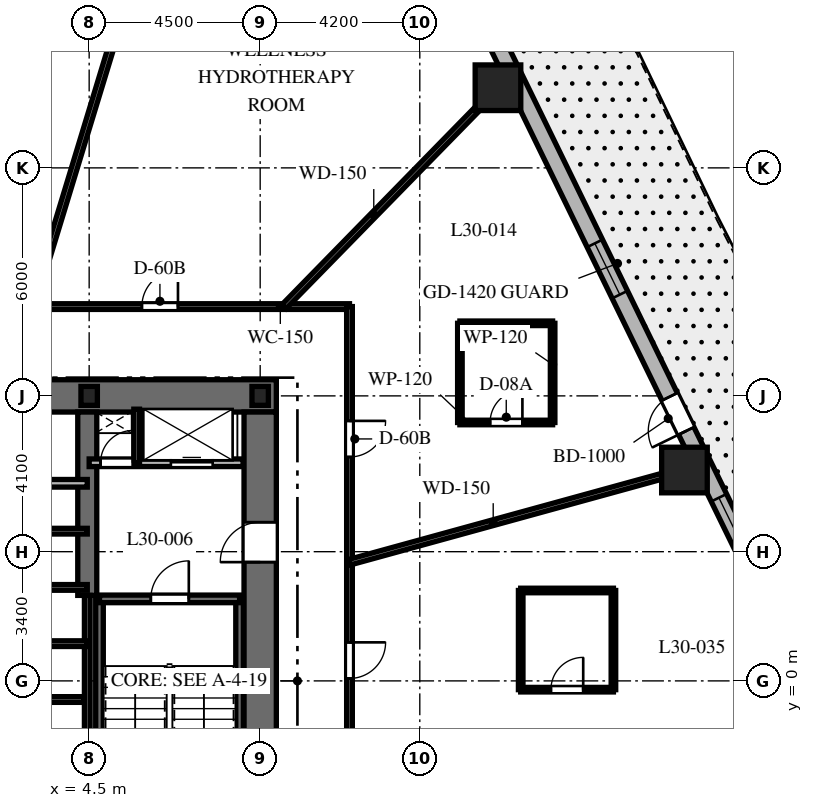
"""IFC4 building model, lengths in metres.
Left out: names, types, materials, properties, quantities, classifications, styles, units other than length and angle.
Written with IfcOpenShell. Run it as: python <this file> out.ifc"""

import sys

from ifc_helpers import new_model, si_unit, direction, frame, frame_2d, origin, origin_2d, place, context, subcontext, project, spatial, rectangle, i_section, extrude, element, fill, save


model = new_model("IFC4")
c1 = context("Model", 3, precision=1e-05, world=origin(), true_north=direction((0.0, 1.0)))
c2 = subcontext(c1, "Body", "Model", "MODEL_VIEW")
j1 = project(units=[si_unit("LENGTHUNIT", "METRE"), si_unit("PLANEANGLEUNIT", "RADIAN")], contexts=[c1])
p1 = place(None, origin())
s1 = spatial("IfcSite", under=j1, at=p1, CompositionType="ELEMENT")
p2 = place(p1, origin())
s2 = spatial("IfcBuilding", under=s1, at=p2, CompositionType="ELEMENT")
p3 = place(p2, frame((0.0, 0.0, 124.7)))
s3 = spatial("IfcBuildingStorey", under=s2, at=p3, CompositionType="ELEMENT", Elevation=124.7)
p4 = place(p3, frame((1.85, 7.5, 0.0), z_axis=(0.0, 0.0, 1.0), x_axis=(1.0, 0.0, 0.0)))
e1 = element("IfcWall", 1, at=p4, inside=s3, PredefinedType="SHEAR", context=c2, shape_type="SweptSolid", body=[
    extrude(rectangle(XDim=7.575, YDim=0.85, at=frame_2d((3.788, 0.0))), origin(), (0.0, 0.0, 1.0), 3.7),
])
p5 = place(p3, frame((9.0, -7.075, 0.0), z_axis=(0.0, 0.0, 1.0), x_axis=(0.0, 1.0, 0.0)))
e2 = element("IfcWall", 2, at=p5, inside=s3, PredefinedType="SHEAR", context=c2, shape_type="SweptSolid", body=[
    extrude(rectangle(XDim=14.15, YDim=0.85, at=frame_2d((7.075, 0.0))), origin(), (0.0, 0.0, 1.0), 3.7),
])
p6 = place(p5, frame((10.2, 0.0, 0.0)))
e3 = element("IfcOpeningElement", 3, at=p6, cuts=e2, PredefinedType="OPENING", context=c2, shape_type="SweptSolid", body=[
    extrude(rectangle(XDim=1.05, YDim=2.15, at=frame_2d((0.525, 1.075))), frame((0.0, 0.435, 0.0), z_axis=(0.0, -1.0, 0.0), x_axis=(1.0, 0.0, 0.0)), (0.0, 0.0, 1.0), 0.87),
])
p7 = place(p3, frame((4.45, 2.25, 0.0), z_axis=(0.0, 0.0, 1.0), x_axis=(0.0, 1.0, 0.0)))
e4 = element("IfcWall", 4, at=p7, inside=s3, PredefinedType="SHEAR", context=c2, shape_type="SweptSolid", body=[
    extrude(rectangle(XDim=4.825, YDim=0.5, at=frame_2d((2.413, 0.0))), origin(), (0.0, 0.0, 1.0), 3.7),
])
for number, where, z_axis, x_axis in (
    (5, (4.772, -6.985, 0.0), (0.0, 0.0, 1.0), (0.0, 1.0, 0.0)),
    (6, (8.458, -6.985, 0.0), (0.0, 0.0, 1.0), (0.0, 1.0, 0.0)),
):
    element("IfcWall", number, at=place(p3, frame(where, z_axis=z_axis, x_axis=x_axis)), inside=s3, PredefinedType="SHEAR", context=c2, shape_type="SweptSolid", body=[
        extrude(rectangle(XDim=9.143, YDim=0.2, at=frame_2d((4.572, 0.0))), origin(), (0.0, 0.0, 1.0), 3.7),
    ])
p8 = place(p3, frame((4.772, 2.158, 0.0), z_axis=(0.0, 0.0, 1.0), x_axis=(1.0, 0.0, 0.0)))
e7 = element("IfcWall", 7, at=p8, inside=s3, PredefinedType="SHEAR", context=c2, shape_type="SweptSolid", body=[
    extrude(rectangle(XDim=3.686, YDim=0.2, at=frame_2d((1.843, 0.0))), origin(), (0.0, 0.0, 1.0), 3.7),
])
p9 = place(p8, frame((1.35, 0.0, 0.0)))
e8 = element("IfcOpeningElement", 8, at=p9, cuts=e7, PredefinedType="OPENING", context=c2, shape_type="SweptSolid", body=[
    extrude(rectangle(XDim=1.0, YDim=2.15, at=frame_2d((0.5, 1.075))), frame((0.0, 0.11, 0.0), z_axis=(0.0, -1.0, 0.0), x_axis=(1.0, 0.0, 0.0)), (0.0, 0.0, 1.0), 0.22),
])
for number, where, z_axis, x_axis in (
    (9, (9.0, 7.5, 0.0), (0.0, 0.0, 1.0), (1.0, 0.0, 0.0)),
    (10, (4.5, 7.5, 0.0), (0.0, 0.0, 1.0), (1.0, 0.0, 0.0)),
):
    element("IfcColumn", number, at=place(p3, frame(where, z_axis=z_axis, x_axis=x_axis)), inside=s3, PredefinedType="COLUMN", context=c2, shape_type="SweptSolid", body=[
        extrude(i_section(OverallWidth=0.432, OverallDepth=0.498, WebThickness=0.056, FlangeThickness=0.089, at=origin_2d()), origin(), (0.0, 0.0, 1.0), 3.7),
    ])
for number, where, z_axis, x_axis in (
    (11, (20.164, 5.549, 0.0), (0.0, 0.0, 1.0), (1.0, 0.0, 0.0)),
    (12, (15.257, 15.609, 0.0), (0.0, 0.0, 1.0), (1.0, 0.0, 0.0)),
):
    element("IfcColumn", number, at=place(p3, frame(where, z_axis=z_axis, x_axis=x_axis)), inside=s3, PredefinedType="COLUMN", context=c2, shape_type="SweptSolid", body=[
        extrude(rectangle(XDim=1.2, YDim=1.2, at=origin_2d()), origin(), (0.0, 0.0, 1.0), 3.7),
    ])
p10 = place(p3, frame((15.992, -18.777, 0.0), z_axis=(0.0, 0.0, 1.0), x_axis=(0.325606988926, 0.945505202927, 0.0)))
e13 = element("IfcWall", 13, at=p10, inside=s3, PredefinedType="SOLIDWALL", context=c2, shape_type="SweptSolid", body=[
    extrude(rectangle(XDim=19.669, YDim=0.45, at=frame_2d((9.835, 0.0))), origin(), (0.0, 0.0, 1.0), 3.4),
])
p11 = place(p10, frame((1.197, 0.0, 0.8)))
e14 = element("IfcOpeningElement", 14, at=p11, cuts=e13, PredefinedType="OPENING", context=c2, shape_type="SweptSolid", body=[
    extrude(rectangle(XDim=1.5, YDim=1.8, at=frame_2d((0.75, 0.9))), frame((0.0, 0.235, 0.0), z_axis=(0.0, -1.0, 0.0), x_axis=(1.0, 0.0, 0.0)), (0.0, 0.0, 1.0), 0.47),
])
p12 = place(p10, frame((9.03, 0.0, 0.8)))
e15 = element("IfcOpeningElement", 15, at=p12, cuts=e13, PredefinedType="OPENING", context=c2, shape_type="SweptSolid", body=[
    extrude(rectangle(XDim=1.5, YDim=1.8, at=frame_2d((0.75, 0.9))), frame((0.0, 0.235, 0.0), z_axis=(0.0, -1.0, 0.0), x_axis=(1.0, 0.0, 0.0)), (0.0, 0.0, 1.0), 0.47),
])
p13 = place(p10, frame((16.918, 0.0, 0.8)))
e16 = element("IfcOpeningElement", 16, at=p13, cuts=e13, PredefinedType="OPENING", context=c2, shape_type="SweptSolid", body=[
    extrude(rectangle(XDim=1.5, YDim=1.8, at=frame_2d((0.75, 0.9))), frame((0.0, 0.235, 0.0), z_axis=(0.0, -1.0, 0.0), x_axis=(1.0, 0.0, 0.0)), (0.0, 0.0, 1.0), 0.47),
])
p14 = place(p3, frame((22.238, 2.427, 0.0), z_axis=(0.0, 0.0, 1.0), x_axis=(-0.438374803278, 0.898792262901, 0.0)))
e17 = element("IfcWall", 17, at=p14, inside=s3, PredefinedType="SOLIDWALL", context=c2, shape_type="SweptSolid", body=[
    extrude(rectangle(XDim=18.618, YDim=0.45, at=frame_2d((9.309, 0.0))), origin(), (0.0, 0.0, 1.0), 3.4),
])
p15 = place(p14, frame((4.62, 0.0, 0.0)))
e18 = element("IfcOpeningElement", 18, at=p15, cuts=e17, PredefinedType="OPENING", context=c2, shape_type="SweptSolid", body=[
    extrude(rectangle(XDim=1.0, YDim=2.15, at=frame_2d((0.5, 1.075))), frame((0.0, 0.235, 0.0), z_axis=(0.0, -1.0, 0.0), x_axis=(1.0, 0.0, 0.0)), (0.0, 0.0, 1.0), 0.47),
])
p16 = place(p14, frame((8.61, 0.0, 0.8)))
e19 = element("IfcOpeningElement", 19, at=p16, cuts=e17, PredefinedType="OPENING", context=c2, shape_type="SweptSolid", body=[
    extrude(rectangle(XDim=1.5, YDim=1.8, at=frame_2d((0.75, 0.9))), frame((0.0, 0.235, 0.0), z_axis=(0.0, -1.0, 0.0), x_axis=(1.0, 0.0, 0.0)), (0.0, 0.0, 1.0), 0.47),
])
p17 = place(p14, frame((16.006, 0.0, 0.8)))
e20 = element("IfcOpeningElement", 20, at=p17, cuts=e17, PredefinedType="OPENING", context=c2, shape_type="SweptSolid", body=[
    extrude(rectangle(XDim=1.5, YDim=1.8, at=frame_2d((0.75, 0.9))), frame((0.0, 0.235, 0.0), z_axis=(0.0, -1.0, 0.0), x_axis=(1.0, 0.0, 0.0)), (0.0, 0.0, 1.0), 0.47),
])
p18 = place(p14, frame((1.163, 0.0, 0.8)))
e21 = element("IfcOpeningElement", 21, at=p18, cuts=e17, PredefinedType="OPENING", context=c2, shape_type="SweptSolid", body=[
    extrude(rectangle(XDim=1.5, YDim=1.8, at=frame_2d((0.75, 0.9))), frame((0.0, 0.235, 0.0), z_axis=(0.0, -1.0, 0.0), x_axis=(1.0, 0.0, 0.0)), (0.0, 0.0, 1.0), 0.47),
])
p19 = place(p3, frame((4.5, 5.74, 0.0), z_axis=(0.0, 0.0, 1.0), x_axis=(1.0, 0.0, 0.0)))
e22 = element("IfcWall", 22, at=p19, inside=s3, PredefinedType="PARTITIONING", context=c2, shape_type="SweptSolid", body=[
    extrude(rectangle(XDim=4.05, YDim=0.2, at=frame_2d((2.025, 0.0))), origin(), (0.0, 0.0, 1.0), 3.4),
])
p20 = place(p19, frame((0.3, 0.0, 0.0)))
e23 = element("IfcOpeningElement", 23, at=p20, cuts=e22, PredefinedType="OPENING", context=c2, shape_type="SweptSolid", body=[
    extrude(rectangle(XDim=0.85, YDim=2.03, at=frame_2d((0.425, 1.015))), frame((0.0, 0.11, 0.0), z_axis=(0.0, -1.0, 0.0), x_axis=(1.0, 0.0, 0.0)), (0.0, 0.0, 1.0), 0.22),
])
p21 = place(p19, frame((2.15, 0.0, 0.0)))
e24 = element("IfcOpeningElement", 24, at=p21, cuts=e22, PredefinedType="OPENING", context=c2, shape_type="SweptSolid", body=[
    extrude(rectangle(XDim=1.1, YDim=2.2, at=frame_2d((0.55, 1.1))), frame((0.0, 0.11, 0.0), z_axis=(0.0, -1.0, 0.0), x_axis=(1.0, 0.0, 0.0)), (0.0, 0.0, 1.0), 0.22),
])
p22 = place(p3, frame((5.75, 5.74, 0.0), z_axis=(0.0, 0.0, 1.0), x_axis=(0.0, 1.0, 0.0)))
e25 = element("IfcWall", 25, at=p22, inside=s3, PredefinedType="PARTITIONING", context=c2, shape_type="SweptSolid", body=[
    extrude(rectangle(XDim=1.41, YDim=0.15, at=frame_2d((0.705, 0.0))), origin(), (0.0, 0.0, 1.0), 3.4),
])
p23 = place(p3, frame((1.85, 5.2, 0.0), z_axis=(0.0, 0.0, 1.0), x_axis=(1.0, 0.0, 0.0)))
e26 = element("IfcWall", 26, at=p23, inside=s3, PredefinedType="PARTITIONING", context=c2, shape_type="SweptSolid", body=[
    extrude(rectangle(XDim=2.6, YDim=0.2, at=frame_2d((1.3, 0.0))), origin(), (0.0, 0.0, 1.0), 3.4),
])
p24 = place(p3, frame((4.45, -1.972, 0.0), z_axis=(0.0, 0.0, 1.0), x_axis=(0.0, 1.0, 0.0)))
e27 = element("IfcWall", 27, at=p24, inside=s3, PredefinedType="PARTITIONING", context=c2, shape_type="SweptSolid", body=[
    extrude(rectangle(XDim=4.222, YDim=0.15, at=frame_2d((2.111, 0.0))), origin(), (0.0, 0.0, 1.0), 3.4),
])
for number, where, z_axis, x_axis in (
    (28, (1.9, 3.94, 0.0), (0.0, 0.0, 1.0), (1.0, 0.0, 0.0)),
    (29, (1.9, 0.98, 0.0), (0.0, 0.0, 1.0), (1.0, 0.0, 0.0)),
    (30, (1.9, 2.46, 0.0), (0.0, 0.0, 1.0), (1.0, 0.0, 0.0)),
):
    element("IfcWall", number, at=place(p3, frame(where, z_axis=z_axis, x_axis=x_axis)), inside=s3, PredefinedType="PARTITIONING", context=c2, shape_type="SweptSolid", body=[
        extrude(rectangle(XDim=2.55, YDim=0.15, at=frame_2d((1.275, 0.0))), origin(), (0.0, 0.0, 1.0), 3.4),
    ])
p25 = place(p3, frame((-4.36, -0.49, 0.0), z_axis=(0.0, 0.0, 1.0), x_axis=(1.0, 0.0, 0.0)))
e31 = element("IfcWall", 31, at=p25, inside=s3, PredefinedType="PARTITIONING", context=c2, shape_type="SweptSolid", body=[
    extrude(rectangle(XDim=8.72, YDim=0.15, at=frame_2d((4.36, 0.0))), origin(), (0.0, 0.0, 1.0), 3.4),
])
p26 = place(p25, frame((2.81, 0.0, 0.0)))
e32 = element("IfcOpeningElement", 32, at=p26, cuts=e31, PredefinedType="OPENING", context=c2, shape_type="SweptSolid", body=[
    extrude(rectangle(XDim=0.85, YDim=2.03, at=frame_2d((0.425, 1.015))), frame((0.0, 0.085, 0.0), z_axis=(0.0, -1.0, 0.0), x_axis=(1.0, 0.0, 0.0)), (0.0, 0.0, 1.0), 0.17),
])
p27 = place(p25, frame((4.61, 0.0, 0.0)))
e33 = element("IfcOpeningElement", 33, at=p27, cuts=e31, PredefinedType="OPENING", context=c2, shape_type="SweptSolid", body=[
    extrude(rectangle(XDim=0.85, YDim=2.03, at=frame_2d((0.425, 1.015))), frame((0.0, 0.085, 0.0), z_axis=(0.0, -1.0, 0.0), x_axis=(1.0, 0.0, 0.0)), (0.0, 0.0, 1.0), 0.17),
])
p28 = place(p3, frame((-11.35, 9.85, 0.0), z_axis=(0.0, 0.0, 1.0), x_axis=(1.0, 0.0, 0.0)))
e34 = element("IfcWall", 34, at=p28, inside=s3, PredefinedType="PARTITIONING", context=c2, shape_type="SweptSolid", body=[
    extrude(rectangle(XDim=22.7, YDim=0.15, at=frame_2d((11.35, 0.0))), origin(), (0.0, 0.0, 1.0), 2.84),
])
p29 = place(p28, frame((17.237, 0.0, 0.0)))
e35 = element("IfcOpeningElement", 35, at=p29, cuts=e34, PredefinedType="OPENING", context=c2, shape_type="SweptSolid", body=[
    extrude(rectangle(XDim=0.95, YDim=2.03, at=frame_2d((0.475, 1.015))), frame((0.0, 0.085, 0.0), z_axis=(0.0, -1.0, 0.0), x_axis=(1.0, 0.0, 0.0)), (0.0, 0.0, 1.0), 0.17),
])
p30 = place(p28, frame((11.994, 0.0, 0.0)))
e36 = element("IfcOpeningElement", 36, at=p30, cuts=e34, PredefinedType="OPENING", context=c2, shape_type="SweptSolid", body=[
    extrude(rectangle(XDim=0.95, YDim=2.03, at=frame_2d((0.475, 1.015))), frame((0.0, 0.085, 0.0), z_axis=(0.0, -1.0, 0.0), x_axis=(1.0, 0.0, 0.0)), (0.0, 0.0, 1.0), 0.17),
])
p31 = place(p28, frame((8.559, 0.0, 0.0)))
e37 = element("IfcOpeningElement", 37, at=p31, cuts=e34, PredefinedType="OPENING", context=c2, shape_type="SweptSolid", body=[
    extrude(rectangle(XDim=0.95, YDim=2.03, at=frame_2d((0.475, 1.015))), frame((0.0, 0.085, 0.0), z_axis=(0.0, -1.0, 0.0), x_axis=(1.0, 0.0, 0.0)), (0.0, 0.0, 1.0), 0.17),
])
p32 = place(p28, frame((3.399, 0.0, 0.0)))
e38 = element("IfcOpeningElement", 38, at=p32, cuts=e34, PredefinedType="OPENING", context=c2, shape_type="SweptSolid", body=[
    extrude(rectangle(XDim=0.95, YDim=2.03, at=frame_2d((0.475, 1.015))), frame((0.0, 0.085, 0.0), z_axis=(0.0, -1.0, 0.0), x_axis=(1.0, 0.0, 0.0)), (0.0, 0.0, 1.0), 0.17),
])
p33 = place(p3, frame((11.35, 9.85, 0.0), z_axis=(0.0, 0.0, 1.0), x_axis=(0.0, -1.0, 0.0)))
e39 = element("IfcWall", 39, at=p33, inside=s3, PredefinedType="PARTITIONING", context=c2, shape_type="SweptSolid", body=[
    extrude(rectangle(XDim=19.7, YDim=0.15, at=frame_2d((9.85, 0.0))), origin(), (0.0, 0.0, 1.0), 2.84),
])
p34 = place(p33, frame((3.008, 0.0, 0.0)))
e40 = element("IfcOpeningElement", 40, at=p34, cuts=e39, PredefinedType="OPENING", context=c2, shape_type="SweptSolid", body=[
    extrude(rectangle(XDim=0.95, YDim=2.03, at=frame_2d((0.475, 1.015))), frame((0.0, 0.085, 0.0), z_axis=(0.0, -1.0, 0.0), x_axis=(1.0, 0.0, 0.0)), (0.0, 0.0, 1.0), 0.17),
])
p35 = place(p33, frame((15.205, 0.0, 0.0)))
e41 = element("IfcOpeningElement", 41, at=p35, cuts=e39, PredefinedType="OPENING", context=c2, shape_type="SweptSolid", body=[
    extrude(rectangle(XDim=0.95, YDim=2.03, at=frame_2d((0.475, 1.015))), frame((0.0, 0.085, 0.0), z_axis=(0.0, -1.0, 0.0), x_axis=(1.0, 0.0, 0.0)), (0.0, 0.0, 1.0), 0.17),
])
p36 = place(p33, frame((8.836, 0.0, 0.0)))
e42 = element("IfcOpeningElement", 42, at=p36, cuts=e39, PredefinedType="OPENING", context=c2, shape_type="SweptSolid", body=[
    extrude(rectangle(XDim=0.95, YDim=2.03, at=frame_2d((0.475, 1.015))), frame((0.0, 0.085, 0.0), z_axis=(0.0, -1.0, 0.0), x_axis=(1.0, 0.0, 0.0)), (0.0, 0.0, 1.0), 0.17),
])
p37 = place(p3, frame((11.35, 3.123, 0.0), z_axis=(0.0, 0.0, 1.0), x_axis=(0.964151983214, 0.265350623261, 0.0)))
e43 = element("IfcWall", 43, at=p37, inside=s3, PredefinedType="PARTITIONING", context=c2, shape_type="SweptSolid", body=[
    extrude(rectangle(XDim=9.645, YDim=0.15, at=frame_2d((4.823, 0.0))), origin(), (0.0, 0.0, 1.0), 2.54),
])
p38 = place(p3, frame((9.628, 9.85, 0.0), z_axis=(0.0, 0.0, 1.0), x_axis=(0.698992824326, 0.715128681805, 0.0)))
e44 = element("IfcWall", 44, at=p38, inside=s3, PredefinedType="PARTITIONING", context=c2, shape_type="SweptSolid", body=[
    extrude(rectangle(XDim=8.579, YDim=0.15, at=frame_2d((4.29, 0.0))), origin(), (0.0, 0.0, 1.0), 2.54),
])
p39 = place(p3, frame((3.0, 9.85, 0.0), z_axis=(0.0, 0.0, 1.0), x_axis=(0.291352035382, 0.95661590593, 0.0)))
e45 = element("IfcWall", 45, at=p39, inside=s3, PredefinedType="PARTITIONING", context=c2, shape_type="SweptSolid", body=[
    extrude(rectangle(XDim=11.734, YDim=0.15, at=frame_2d((5.867, 0.0))), origin(), (0.0, 0.0, 1.0), 2.54),
])
p40 = place(p3, frame((14.255, 6.8, 0.0), z_axis=(0.0, 0.0, 1.0), x_axis=(1.0, 0.0, 0.0)))
e46 = element("IfcWall", 46, at=p40, inside=s3, PredefinedType="PARTITIONING", context=c2, shape_type="SweptSolid", body=[
    extrude(rectangle(XDim=2.44, YDim=0.12, at=frame_2d((1.22, 0.0))), origin(), (0.0, 0.0, 1.0), 2.927),
])
p41 = place(p40, frame((0.795, 0.0, 0.0)))
e47 = element("IfcOpeningElement", 47, at=p41, cuts=e46, PredefinedType="OPENING", context=c2, shape_type="SweptSolid", body=[
    extrude(rectangle(XDim=0.85, YDim=2.03, at=frame_2d((0.425, 1.015))), frame((0.0, 0.07, 0.0), z_axis=(0.0, -1.0, 0.0), x_axis=(1.0, 0.0, 0.0)), (0.0, 0.0, 1.0), 0.14),
])
p42 = place(p3, frame((16.695, 6.8, 0.0), z_axis=(0.0, 0.0, 1.0), x_axis=(0.0, 1.0, 0.0)))
e48 = element("IfcWall", 48, at=p42, inside=s3, PredefinedType="PARTITIONING", context=c2, shape_type="SweptSolid", body=[
    extrude(rectangle(XDim=2.61, YDim=0.12, at=frame_2d((1.305, 0.0))), origin(), (0.0, 0.0, 1.0), 3.4),
])
p43 = place(p3, frame((16.695, 9.41, 0.0), z_axis=(0.0, 0.0, 1.0), x_axis=(-1.0, 0.0, 0.0)))
e49 = element("IfcWall", 49, at=p43, inside=s3, PredefinedType="PARTITIONING", context=c2, shape_type="SweptSolid", body=[
    extrude(rectangle(XDim=2.44, YDim=0.12, at=frame_2d((1.22, 0.0))), origin(), (0.0, 0.0, 1.0), 2.927),
])
p44 = place(p3, frame((14.255, 9.41, 0.0), z_axis=(0.0, 0.0, 1.0), x_axis=(0.0, -1.0, 0.0)))
e50 = element("IfcWall", 50, at=p44, inside=s3, PredefinedType="PARTITIONING", context=c2, shape_type="SweptSolid", body=[
    extrude(rectangle(XDim=2.61, YDim=0.12, at=frame_2d((1.305, 0.0))), origin(), (0.0, 0.0, 1.0), 3.4),
])
p45 = place(p3, frame((15.855, -0.231, 0.0), z_axis=(0.0, 0.0, 1.0), x_axis=(1.0, 0.0, 0.0)))
e51 = element("IfcWall", 51, at=p45, inside=s3, PredefinedType="PARTITIONING", context=c2, shape_type="SweptSolid", body=[
    extrude(rectangle(XDim=2.44, YDim=0.12, at=frame_2d((1.22, 0.0))), origin(), (0.0, 0.0, 1.0), 2.84),
])
p46 = place(p45, frame((0.795, 0.0, 0.0)))
e52 = element("IfcOpeningElement", 52, at=p46, cuts=e51, PredefinedType="OPENING", context=c2, shape_type="SweptSolid", body=[
    extrude(rectangle(XDim=0.85, YDim=2.03, at=frame_2d((0.425, 1.015))), frame((0.0, 0.07, 0.0), z_axis=(0.0, -1.0, 0.0), x_axis=(1.0, 0.0, 0.0)), (0.0, 0.0, 1.0), 0.14),
])
p47 = place(p3, frame((18.295, -0.231, 0.0), z_axis=(0.0, 0.0, 1.0), x_axis=(0.0, 1.0, 0.0)))
e53 = element("IfcWall", 53, at=p47, inside=s3, PredefinedType="PARTITIONING", context=c2, shape_type="SweptSolid", body=[
    extrude(rectangle(XDim=2.61, YDim=0.12, at=frame_2d((1.305, 0.0))), origin(), (0.0, 0.0, 1.0), 3.4),
])
p48 = place(p3, frame((18.295, 2.379, 0.0), z_axis=(0.0, 0.0, 1.0), x_axis=(-1.0, 0.0, 0.0)))
e54 = element("IfcWall", 54, at=p48, inside=s3, PredefinedType="PARTITIONING", context=c2, shape_type="SweptSolid", body=[
    extrude(rectangle(XDim=2.44, YDim=0.12, at=frame_2d((1.22, 0.0))), origin(), (0.0, 0.0, 1.0), 2.84),
])
p49 = place(p3, frame((15.855, 2.379, 0.0), z_axis=(0.0, 0.0, 1.0), x_axis=(0.0, -1.0, 0.0)))
e55 = element("IfcWall", 55, at=p49, inside=s3, PredefinedType="PARTITIONING", context=c2, shape_type="SweptSolid", body=[
    extrude(rectangle(XDim=2.61, YDim=0.12, at=frame_2d((1.305, 0.0))), origin(), (0.0, 0.0, 1.0), 3.4),
])
p50 = place(p15, origin())
e56 = element("IfcDoor", 56, at=p50, inside=s3, OperationType="SINGLE_SWING_LEFT", PredefinedType="DOOR", context=c2, shape_type="SweptSolid", body=[
    extrude(rectangle(XDim=1.0, YDim=2.15, at=frame_2d((0.5, 1.075))), frame((0.0, 0.025, 0.0), z_axis=(0.0, -1.0, 0.0), x_axis=(1.0, 0.0, 0.0)), (0.0, 0.0, 1.0), 0.05),
])
fill(e18, e56)
p51 = place(p16, origin())
e57 = element("IfcWindow", 57, at=p51, inside=s3, PartitioningType="SINGLE_PANEL", PredefinedType="WINDOW", context=c2, shape_type="SweptSolid", body=[
    extrude(rectangle(XDim=1.5, YDim=1.8, at=frame_2d((0.75, 0.9))), frame((0.0, 0.03, 0.0), z_axis=(0.0, -1.0, 0.0), x_axis=(1.0, 0.0, 0.0)), (0.0, 0.0, 1.0), 0.06),
])
fill(e19, e57)
p52 = place(p18, origin())
e58 = element("IfcWindow", 58, at=p52, inside=s3, PartitioningType="SINGLE_PANEL", PredefinedType="WINDOW", context=c2, shape_type="SweptSolid", body=[
    extrude(rectangle(XDim=1.5, YDim=1.8, at=frame_2d((0.75, 0.9))), frame((0.0, 0.03, 0.0), z_axis=(0.0, -1.0, 0.0), x_axis=(1.0, 0.0, 0.0)), (0.0, 0.0, 1.0), 0.06),
])
fill(e21, e58)
p53 = place(p9, origin())
e59 = element("IfcDoor", 59, at=p53, inside=s3, OperationType="SINGLE_SWING_RIGHT", PredefinedType="DOOR", context=c2, shape_type="SweptSolid", body=[
    extrude(rectangle(XDim=1.0, YDim=2.15, at=frame_2d((0.5, 1.075))), frame((0.0, 0.025, 0.0), z_axis=(0.0, -1.0, 0.0), x_axis=(1.0, 0.0, 0.0)), (0.0, 0.0, 1.0), 0.05),
])
fill(e8, e59)
p54 = place(p6, origin())
e60 = element("IfcDoor", 60, at=p54, inside=s3, OperationType="SINGLE_SWING_LEFT", PredefinedType="DOOR", context=c2, shape_type="SweptSolid", body=[
    extrude(rectangle(XDim=1.05, YDim=2.15, at=frame_2d((0.525, 1.075))), frame((0.0, 0.025, 0.0), z_axis=(0.0, -1.0, 0.0), x_axis=(1.0, 0.0, 0.0)), (0.0, 0.0, 1.0), 0.05),
])
fill(e3, e60)
p55 = place(p20, origin())
e61 = element("IfcDoor", 61, at=p55, inside=s3, OperationType="SINGLE_SWING_RIGHT", PredefinedType="DOOR", context=c2, shape_type="SweptSolid", body=[
    extrude(rectangle(XDim=0.85, YDim=2.03, at=frame_2d((0.425, 1.015))), frame((0.0, 0.025, 0.0), z_axis=(0.0, -1.0, 0.0), x_axis=(1.0, 0.0, 0.0)), (0.0, 0.0, 1.0), 0.05),
])
fill(e23, e61)
p56 = place(p21, origin())
e62 = element("IfcDoor", 62, at=p56, inside=s3, OperationType="SLIDING_TO_RIGHT", PredefinedType="DOOR", context=c2, shape_type="SweptSolid", body=[
    extrude(rectangle(XDim=1.1, YDim=2.2, at=frame_2d((0.55, 1.1))), frame((0.0, 0.025, 0.0), z_axis=(0.0, -1.0, 0.0), x_axis=(1.0, 0.0, 0.0)), (0.0, 0.0, 1.0), 0.05),
])
fill(e24, e62)
p57 = place(p34, origin())
e63 = element("IfcDoor", 63, at=p57, inside=s3, OperationType="SINGLE_SWING_LEFT", PredefinedType="DOOR", context=c2, shape_type="SweptSolid", body=[
    extrude(rectangle(XDim=0.95, YDim=2.03, at=frame_2d((0.475, 1.015))), frame((0.0, 0.025, 0.0), z_axis=(0.0, -1.0, 0.0), x_axis=(1.0, 0.0, 0.0)), (0.0, 0.0, 1.0), 0.05),
])
fill(e40, e63)
p58 = place(p41, origin())
e64 = element("IfcDoor", 64, at=p58, inside=s3, OperationType="SINGLE_SWING_RIGHT", PredefinedType="DOOR", context=c2, shape_type="SweptSolid", body=[
    extrude(rectangle(XDim=0.85, YDim=2.03, at=frame_2d((0.425, 1.015))), frame((0.0, 0.025, 0.0), z_axis=(0.0, -1.0, 0.0), x_axis=(1.0, 0.0, 0.0)), (0.0, 0.0, 1.0), 0.05),
])
fill(e47, e64)
p59 = place(p29, origin())
e65 = element("IfcDoor", 65, at=p59, inside=s3, OperationType="SINGLE_SWING_RIGHT", PredefinedType="DOOR", context=c2, shape_type="SweptSolid", body=[
    extrude(rectangle(XDim=0.95, YDim=2.03, at=frame_2d((0.475, 1.015))), frame((0.0, 0.025, 0.0), z_axis=(0.0, -1.0, 0.0), x_axis=(1.0, 0.0, 0.0)), (0.0, 0.0, 1.0), 0.05),
])
fill(e35, e65)
p60 = place(p36, origin())
e66 = element("IfcDoor", 66, at=p60, inside=s3, OperationType="SINGLE_SWING_LEFT", PredefinedType="DOOR", context=c2, shape_type="SweptSolid", body=[
    extrude(rectangle(XDim=0.95, YDim=2.03, at=frame_2d((0.475, 1.015))), frame((0.0, 0.025, 0.0), z_axis=(0.0, -1.0, 0.0), x_axis=(1.0, 0.0, 0.0)), (0.0, 0.0, 1.0), 0.05),
])
fill(e42, e66)
p61 = place(p46, origin())
e67 = element("IfcDoor", 67, at=p61, inside=s3, OperationType="SINGLE_SWING_RIGHT", PredefinedType="DOOR", context=c2, shape_type="SweptSolid", body=[
    extrude(rectangle(XDim=0.85, YDim=2.03, at=frame_2d((0.425, 1.015))), frame((0.0, 0.025, 0.0), z_axis=(0.0, -1.0, 0.0), x_axis=(1.0, 0.0, 0.0)), (0.0, 0.0, 1.0), 0.05),
])
fill(e52, e67)
save(model, sys.argv[1])
